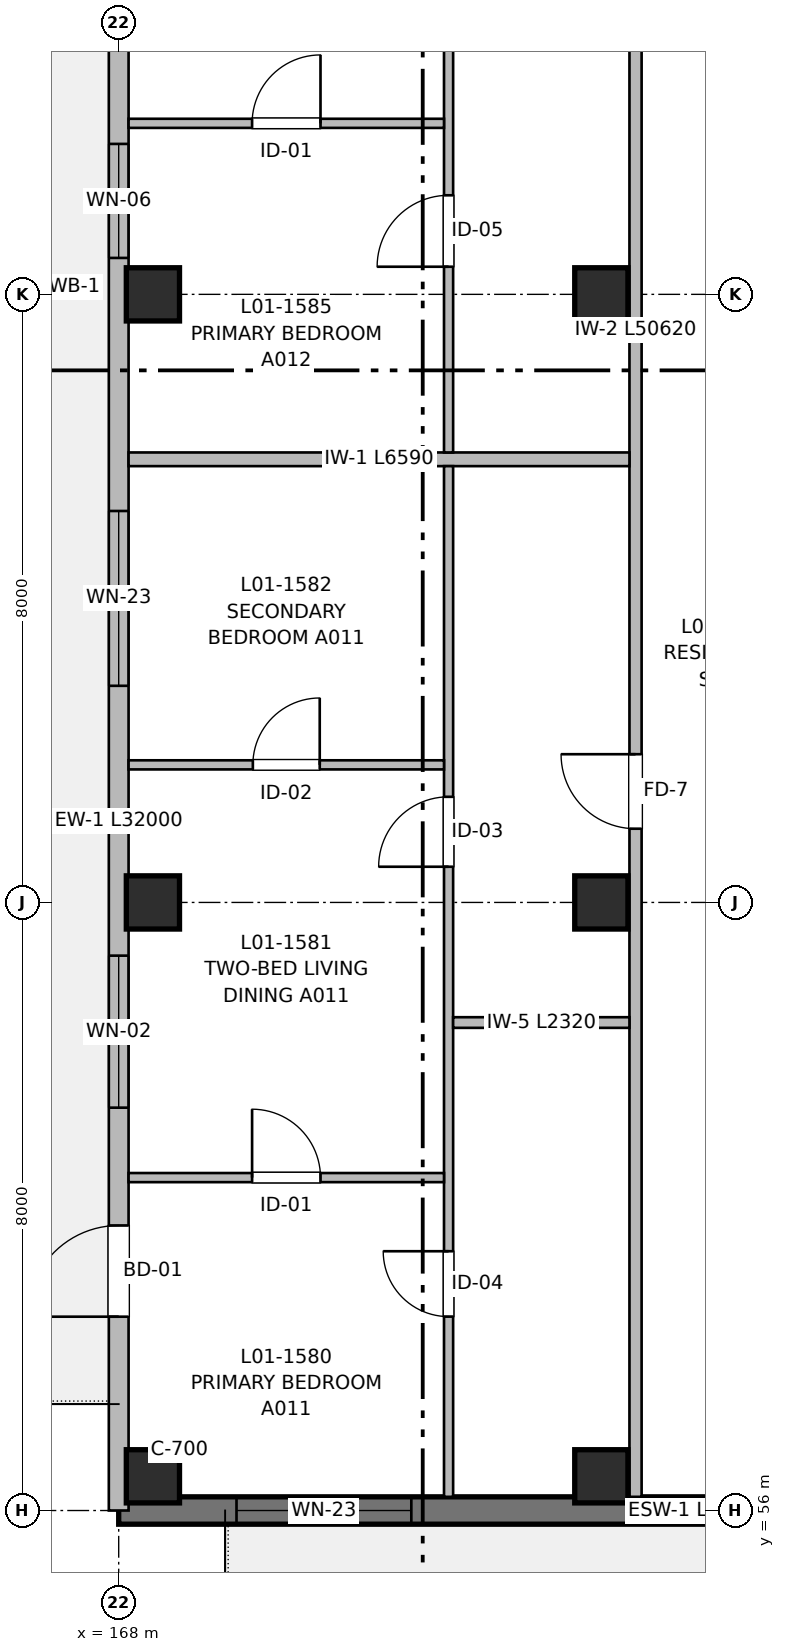
"""IFC4 building model, lengths in metres.
Left out: names, types, materials, properties, quantities, classifications, styles, units other than length and angle.
Written with IfcOpenShell. Run it as: python <this file> out.ifc"""

import sys

from ifc_helpers import new_model, si_unit, direction, frame, frame_2d, origin, origin_2d, place, context, subcontext, project, spatial, rectangle, extrude, element, fill, save


model = new_model("IFC4")
c1 = context("Model", 3, precision=1e-05, world=origin(), true_north=direction((0.0, 1.0)))
c2 = subcontext(c1, "Body", "Model", "MODEL_VIEW")
j1 = project(units=[si_unit("LENGTHUNIT", "METRE"), si_unit("PLANEANGLEUNIT", "RADIAN")], contexts=[c1])
p1 = place(None, origin())
s1 = spatial("IfcSite", under=j1, at=p1, CompositionType="ELEMENT")
p2 = place(p1, origin())
s2 = spatial("IfcBuilding", under=s1, at=p2, CompositionType="ELEMENT")
p3 = place(p2, frame((0.0, 0.0, 4.16)))
s3 = spatial("IfcBuildingStorey", under=s2, at=p3, CompositionType="ELEMENT", Elevation=4.16)
for number, where, z_axis, x_axis in (
    (1, (168.45, 56.45, 0.0), (0.0, 0.0, 1.0), (1.0, 0.0, 0.0)),
    (2, (168.45, 64.0, 0.0), (0.0, 0.0, 1.0), (1.0, 0.0, 0.0)),
    (3, (168.45, 72.0, 0.0), (0.0, 0.0, 1.0), (1.0, 0.0, 0.0)),
    (4, (174.35, 56.45, 0.0), (0.0, 0.0, 1.0), (1.0, 0.0, 0.0)),
    (5, (174.35, 64.0, 0.0), (0.0, 0.0, 1.0), (1.0, 0.0, 0.0)),
    (6, (174.35, 72.0, 0.0), (0.0, 0.0, 1.0), (1.0, 0.0, 0.0)),
):
    element("IfcColumn", number, at=place(p3, frame(where, z_axis=z_axis, x_axis=x_axis)), inside=s3, PredefinedType="COLUMN", context=c2, shape_type="SweptSolid", body=[
        extrude(rectangle(XDim=0.7, YDim=0.7, at=origin_2d()), origin(), (0.0, 0.0, 1.0), 3.2),
    ])
p4 = place(p3, frame((184.0, 56.0, 0.0), z_axis=(0.0, 0.0, 1.0), x_axis=(-1.0, 0.0, 0.0)))
e7 = element("IfcWall", 7, at=p4, inside=s3, PredefinedType="SHEAR", context=c2, shape_type="SweptSolid", body=[
    extrude(rectangle(XDim=16.0, YDim=0.36, at=frame_2d((8.0, 0.0))), origin(), (0.0, 0.0, 1.0), 2.98),
])
p5 = place(p4, frame((3.4, 0.0, 0.0)))
e8 = element("IfcOpeningElement", 8, at=p5, cuts=e7, PredefinedType="OPENING", context=c2, shape_type="SweptSolid", body=[
    extrude(rectangle(XDim=1.2, YDim=2.2, at=frame_2d((0.6, 1.1))), frame((0.0, 0.19, 0.0), z_axis=(0.0, -1.0, 0.0), x_axis=(1.0, 0.0, 0.0)), (0.0, 0.0, 1.0), 0.38),
])
p6 = place(p4, frame((12.15, 0.0, 0.57)))
e9 = element("IfcOpeningElement", 9, at=p6, cuts=e7, PredefinedType="OPENING", context=c2, shape_type="SweptSolid", body=[
    extrude(rectangle(XDim=2.3, YDim=1.65, at=frame_2d((1.15, 0.825))), frame((0.0, 0.19, 0.0), z_axis=(0.0, -1.0, 0.0), x_axis=(1.0, 0.0, 0.0)), (0.0, 0.0, 1.0), 0.38),
])
p7 = place(p3, frame((168.0, 56.0, 0.0), z_axis=(0.0, 0.0, 1.0), x_axis=(0.0, 1.0, 0.0)))
e10 = element("IfcWall", 10, at=p7, inside=s3, PredefinedType="SOLIDWALL", context=c2, shape_type="SweptSolid", body=[
    extrude(rectangle(XDim=32.0, YDim=0.26, at=frame_2d((16.0, 0.0))), origin(), (0.0, 0.0, 1.0), 2.98),
])
p8 = place(p7, frame((2.55, 0.0, 0.0)))
e11 = element("IfcOpeningElement", 11, at=p8, cuts=e10, PredefinedType="OPENING", context=c2, shape_type="SweptSolid", body=[
    extrude(rectangle(XDim=1.2, YDim=2.2, at=frame_2d((0.6, 1.1))), frame((0.0, 0.14, 0.0), z_axis=(0.0, -1.0, 0.0), x_axis=(1.0, 0.0, 0.0)), (0.0, 0.0, 1.0), 0.28),
])
p9 = place(p7, frame((5.3, 0.0, 0.72)))
e12 = element("IfcOpeningElement", 12, at=p9, cuts=e10, PredefinedType="OPENING", context=c2, shape_type="SweptSolid", body=[
    extrude(rectangle(XDim=2.0, YDim=1.5, at=frame_2d((1.0, 0.75))), frame((0.0, 0.14, 0.0), z_axis=(0.0, -1.0, 0.0), x_axis=(1.0, 0.0, 0.0)), (0.0, 0.0, 1.0), 0.28),
])
p10 = place(p7, frame((10.85, 0.0, 0.57)))
e13 = element("IfcOpeningElement", 13, at=p10, cuts=e10, PredefinedType="OPENING", context=c2, shape_type="SweptSolid", body=[
    extrude(rectangle(XDim=2.3, YDim=1.65, at=frame_2d((1.15, 0.825))), frame((0.0, 0.14, 0.0), z_axis=(0.0, -1.0, 0.0), x_axis=(1.0, 0.0, 0.0)), (0.0, 0.0, 1.0), 0.28),
])
p11 = place(p7, frame((19.275, 0.0, 0.77)))
e14 = element("IfcOpeningElement", 14, at=p11, cuts=e10, PredefinedType="OPENING", context=c2, shape_type="SweptSolid", body=[
    extrude(rectangle(XDim=1.45, YDim=1.45, at=frame_2d((0.725, 0.725))), frame((0.0, 0.14, 0.0), z_axis=(0.0, -1.0, 0.0), x_axis=(1.0, 0.0, 0.0)), (0.0, 0.0, 1.0), 0.28),
])
p12 = place(p7, frame((28.325, 0.0, 0.72)))
e15 = element("IfcOpeningElement", 15, at=p12, cuts=e10, PredefinedType="OPENING", context=c2, shape_type="SweptSolid", body=[
    extrude(rectangle(XDim=1.95, YDim=1.5, at=frame_2d((0.975, 0.75))), frame((0.0, 0.14, 0.0), z_axis=(0.0, -1.0, 0.0), x_axis=(1.0, 0.0, 0.0)), (0.0, 0.0, 1.0), 0.28),
])
p13 = place(p7, frame((16.479, 0.0, 0.82)))
e16 = element("IfcOpeningElement", 16, at=p13, cuts=e10, PredefinedType="OPENING", context=c2, shape_type="SweptSolid", body=[
    extrude(rectangle(XDim=1.5, YDim=1.4, at=frame_2d((0.75, 0.7))), frame((0.0, 0.14, 0.0), z_axis=(0.0, -1.0, 0.0), x_axis=(1.0, 0.0, 0.0)), (0.0, 0.0, 1.0), 0.28),
])
p14 = place(p7, frame((25.14, 0.0, 0.82)))
e17 = element("IfcOpeningElement", 17, at=p14, cuts=e10, PredefinedType="OPENING", context=c2, shape_type="SweptSolid", body=[
    extrude(rectangle(XDim=1.5, YDim=1.4, at=frame_2d((0.75, 0.7))), frame((0.0, 0.14, 0.0), z_axis=(0.0, -1.0, 0.0), x_axis=(1.0, 0.0, 0.0)), (0.0, 0.0, 1.0), 0.28),
])
p15 = place(p3, frame((174.8, 56.18, 0.0), z_axis=(0.0, 0.0, 1.0), x_axis=(0.0, 1.0, 0.0)))
e18 = element("IfcWall", 18, at=p15, inside=s3, PredefinedType="PARTITIONING", context=c2, shape_type="SweptSolid", body=[
    extrude(rectangle(XDim=50.62, YDim=0.16, at=frame_2d((25.31, 0.0))), origin(), (0.0, 0.0, 1.0), 2.935),
])
p16 = place(p15, frame((8.79, 0.0, 0.0)))
e19 = element("IfcOpeningElement", 19, at=p16, cuts=e18, PredefinedType="OPENING", context=c2, shape_type="SweptSolid", body=[
    extrude(rectangle(XDim=0.98, YDim=2.15, at=frame_2d((0.49, 1.075))), frame((0.0, 0.09, 0.0), z_axis=(0.0, -1.0, 0.0), x_axis=(1.0, 0.0, 0.0)), (0.0, 0.0, 1.0), 0.18),
])
p17 = place(p15, frame((20.92, 0.0, 0.0)))
e20 = element("IfcOpeningElement", 20, at=p17, cuts=e18, PredefinedType="OPENING", context=c2, shape_type="SweptSolid", body=[
    extrude(rectangle(XDim=1.02, YDim=2.15, at=frame_2d((0.51, 1.075))), frame((0.0, 0.09, 0.0), z_axis=(0.0, -1.0, 0.0), x_axis=(1.0, 0.0, 0.0)), (0.0, 0.0, 1.0), 0.18),
])
p18 = place(p15, frame((33.67, 0.0, 0.0)))
e21 = element("IfcOpeningElement", 21, at=p18, cuts=e18, PredefinedType="OPENING", context=c2, shape_type="SweptSolid", body=[
    extrude(rectangle(XDim=0.98, YDim=2.15, at=frame_2d((0.49, 1.075))), frame((0.0, 0.09, 0.0), z_axis=(0.0, -1.0, 0.0), x_axis=(1.0, 0.0, 0.0)), (0.0, 0.0, 1.0), 0.18),
])
p19 = place(p15, frame((45.06, 0.0, 0.0)))
e22 = element("IfcOpeningElement", 22, at=p19, cuts=e18, PredefinedType="OPENING", context=c2, shape_type="SweptSolid", body=[
    extrude(rectangle(XDim=0.98, YDim=2.15, at=frame_2d((0.49, 1.075))), frame((0.0, 0.09, 0.0), z_axis=(0.0, -1.0, 0.0), x_axis=(1.0, 0.0, 0.0)), (0.0, 0.0, 1.0), 0.18),
])
p20 = place(p3, frame((168.13, 69.83, 0.0), z_axis=(0.0, 0.0, 1.0), x_axis=(1.0, 0.0, 0.0)))
e23 = element("IfcWall", 23, at=p20, inside=s3, PredefinedType="PARTITIONING", context=c2, shape_type="SweptSolid", body=[
    extrude(rectangle(XDim=6.59, YDim=0.18, at=frame_2d((3.295, 0.0))), origin(), (0.0, 0.0, 1.0), 2.935),
])
p21 = place(p3, frame((172.34, 56.18, 0.0), z_axis=(0.0, 0.0, 1.0), x_axis=(0.0, 1.0, 0.0)))
e24 = element("IfcWall", 24, at=p21, inside=s3, PredefinedType="PARTITIONING", context=c2, shape_type="SweptSolid", body=[
    extrude(rectangle(XDim=13.56, YDim=0.12, at=frame_2d((6.78, 0.0))), origin(), (0.0, 0.0, 1.0), 2.935),
])
p22 = place(p21, frame((2.371, 0.0, 0.0)))
e25 = element("IfcOpeningElement", 25, at=p22, cuts=e24, PredefinedType="OPENING", context=c2, shape_type="SweptSolid", body=[
    extrude(rectangle(XDim=0.86, YDim=2.1, at=frame_2d((0.43, 1.05))), frame((0.0, 0.07, 0.0), z_axis=(0.0, -1.0, 0.0), x_axis=(1.0, 0.0, 0.0)), (0.0, 0.0, 1.0), 0.14),
])
p23 = place(p21, frame((8.29, 0.0, 0.0)))
e26 = element("IfcOpeningElement", 26, at=p23, cuts=e24, PredefinedType="OPENING", context=c2, shape_type="SweptSolid", body=[
    extrude(rectangle(XDim=0.92, YDim=2.1, at=frame_2d((0.46, 1.05))), frame((0.0, 0.07, 0.0), z_axis=(0.0, -1.0, 0.0), x_axis=(1.0, 0.0, 0.0)), (0.0, 0.0, 1.0), 0.14),
])
p24 = place(p3, frame((172.4, 62.42, 0.0), z_axis=(0.0, 0.0, 1.0), x_axis=(1.0, 0.0, 0.0)))
e27 = element("IfcWall", 27, at=p24, inside=s3, PredefinedType="PARTITIONING", context=c2, shape_type="SweptSolid", body=[
    extrude(rectangle(XDim=2.32, YDim=0.14, at=frame_2d((1.16, 0.0))), origin(), (0.0, 0.0, 1.0), 2.935),
])
p25 = place(p3, frame((168.13, 60.38, 0.0), z_axis=(0.0, 0.0, 1.0), x_axis=(1.0, 0.0, 0.0)))
e28 = element("IfcWall", 28, at=p25, inside=s3, PredefinedType="PARTITIONING", context=c2, shape_type="SweptSolid", body=[
    extrude(rectangle(XDim=4.15, YDim=0.12, at=frame_2d((2.075, 0.0))), origin(), (0.0, 0.0, 1.0), 2.935),
])
p26 = place(p25, frame((1.625, 0.0, 0.0)))
e29 = element("IfcOpeningElement", 29, at=p26, cuts=e28, PredefinedType="OPENING", context=c2, shape_type="SweptSolid", body=[
    extrude(rectangle(XDim=0.9, YDim=2.1, at=frame_2d((0.45, 1.05))), frame((0.0, 0.07, 0.0), z_axis=(0.0, -1.0, 0.0), x_axis=(1.0, 0.0, 0.0)), (0.0, 0.0, 1.0), 0.14),
])
p27 = place(p3, frame((168.13, 65.81, 0.0), z_axis=(0.0, 0.0, 1.0), x_axis=(1.0, 0.0, 0.0)))
e30 = element("IfcWall", 30, at=p27, inside=s3, PredefinedType="PARTITIONING", context=c2, shape_type="SweptSolid", body=[
    extrude(rectangle(XDim=4.15, YDim=0.12, at=frame_2d((2.075, 0.0))), origin(), (0.0, 0.0, 1.0), 2.935),
])
p28 = place(p27, frame((1.635, 0.0, 0.0)))
e31 = element("IfcOpeningElement", 31, at=p28, cuts=e30, PredefinedType="OPENING", context=c2, shape_type="SweptSolid", body=[
    extrude(rectangle(XDim=0.88, YDim=2.1, at=frame_2d((0.44, 1.05))), frame((0.0, 0.07, 0.0), z_axis=(0.0, -1.0, 0.0), x_axis=(1.0, 0.0, 0.0)), (0.0, 0.0, 1.0), 0.14),
])
p29 = place(p3, frame((172.34, 69.92, 0.0), z_axis=(0.0, 0.0, 1.0), x_axis=(0.0, 1.0, 0.0)))
e32 = element("IfcWall", 32, at=p29, inside=s3, PredefinedType="PARTITIONING", context=c2, shape_type="SweptSolid", body=[
    extrude(rectangle(XDim=13.97, YDim=0.12, at=frame_2d((6.985, 0.0))), origin(), (0.0, 0.0, 1.0), 2.935),
])
p30 = place(p29, frame((2.443, 0.0, 0.0)))
e33 = element("IfcOpeningElement", 33, at=p30, cuts=e32, PredefinedType="OPENING", context=c2, shape_type="SweptSolid", body=[
    extrude(rectangle(XDim=0.94, YDim=2.1, at=frame_2d((0.47, 1.05))), frame((0.0, 0.07, 0.0), z_axis=(0.0, -1.0, 0.0), x_axis=(1.0, 0.0, 0.0)), (0.0, 0.0, 1.0), 0.14),
])
p31 = place(p29, frame((8.541, 0.0, 0.0)))
e34 = element("IfcOpeningElement", 34, at=p31, cuts=e32, PredefinedType="OPENING", context=c2, shape_type="SweptSolid", body=[
    extrude(rectangle(XDim=0.92, YDim=2.1, at=frame_2d((0.46, 1.05))), frame((0.0, 0.07, 0.0), z_axis=(0.0, -1.0, 0.0), x_axis=(1.0, 0.0, 0.0)), (0.0, 0.0, 1.0), 0.14),
])
p32 = place(p3, frame((168.13, 74.25, 0.0), z_axis=(0.0, 0.0, 1.0), x_axis=(1.0, 0.0, 0.0)))
e35 = element("IfcWall", 35, at=p32, inside=s3, PredefinedType="PARTITIONING", context=c2, shape_type="SweptSolid", body=[
    extrude(rectangle(XDim=4.15, YDim=0.12, at=frame_2d((2.075, 0.0))), origin(), (0.0, 0.0, 1.0), 2.935),
])
p33 = place(p32, frame((1.625, 0.0, 0.0)))
e36 = element("IfcOpeningElement", 36, at=p33, cuts=e35, PredefinedType="OPENING", context=c2, shape_type="SweptSolid", body=[
    extrude(rectangle(XDim=0.9, YDim=2.1, at=frame_2d((0.45, 1.05))), frame((0.0, 0.07, 0.0), z_axis=(0.0, -1.0, 0.0), x_axis=(1.0, 0.0, 0.0)), (0.0, 0.0, 1.0), 0.14),
])
p34 = place(p6, origin())
e37 = element("IfcWindow", 37, at=p34, inside=s3, PartitioningType="SINGLE_PANEL", PredefinedType="WINDOW", context=c2, shape_type="SweptSolid", body=[
    extrude(rectangle(XDim=2.3, YDim=1.65, at=frame_2d((1.15, 0.825))), frame((0.0, 0.03, 0.0), z_axis=(0.0, -1.0, 0.0), x_axis=(1.0, 0.0, 0.0)), (0.0, 0.0, 1.0), 0.06),
])
fill(e9, e37)
p35 = place(p8, origin())
e38 = element("IfcDoor", 38, at=p35, inside=s3, OperationType="SINGLE_SWING_LEFT", PredefinedType="DOOR", context=c2, shape_type="SweptSolid", body=[
    extrude(rectangle(XDim=1.2, YDim=2.2, at=frame_2d((0.6, 1.1))), frame((0.0, 0.025, 0.0), z_axis=(0.0, -1.0, 0.0), x_axis=(1.0, 0.0, 0.0)), (0.0, 0.0, 1.0), 0.05),
])
fill(e11, e38)
p36 = place(p9, origin())
e39 = element("IfcWindow", 39, at=p36, inside=s3, PartitioningType="SINGLE_PANEL", PredefinedType="WINDOW", context=c2, shape_type="SweptSolid", body=[
    extrude(rectangle(XDim=2.0, YDim=1.5, at=frame_2d((1.0, 0.75))), frame((0.0, 0.03, 0.0), z_axis=(0.0, -1.0, 0.0), x_axis=(1.0, 0.0, 0.0)), (0.0, 0.0, 1.0), 0.06),
])
fill(e12, e39)
p37 = place(p10, origin())
e40 = element("IfcWindow", 40, at=p37, inside=s3, PartitioningType="SINGLE_PANEL", PredefinedType="WINDOW", context=c2, shape_type="SweptSolid", body=[
    extrude(rectangle(XDim=2.3, YDim=1.65, at=frame_2d((1.15, 0.825))), frame((0.0, 0.03, 0.0), z_axis=(0.0, -1.0, 0.0), x_axis=(1.0, 0.0, 0.0)), (0.0, 0.0, 1.0), 0.06),
])
fill(e13, e40)
p38 = place(p22, origin())
e41 = element("IfcDoor", 41, at=p38, inside=s3, OperationType="SINGLE_SWING_RIGHT", PredefinedType="DOOR", context=c2, shape_type="SweptSolid", body=[
    extrude(rectangle(XDim=0.86, YDim=2.1, at=frame_2d((0.43, 1.05))), frame((0.0, 0.025, 0.0), z_axis=(0.0, -1.0, 0.0), x_axis=(1.0, 0.0, 0.0)), (0.0, 0.0, 1.0), 0.05),
])
fill(e25, e41)
p39 = place(p23, origin())
e42 = element("IfcDoor", 42, at=p39, inside=s3, OperationType="SINGLE_SWING_LEFT", PredefinedType="DOOR", context=c2, shape_type="SweptSolid", body=[
    extrude(rectangle(XDim=0.92, YDim=2.1, at=frame_2d((0.46, 1.05))), frame((0.0, 0.025, 0.0), z_axis=(0.0, -1.0, 0.0), x_axis=(1.0, 0.0, 0.0)), (0.0, 0.0, 1.0), 0.05),
])
fill(e26, e42)
p40 = place(p16, origin())
e43 = element("IfcDoor", 43, at=p40, inside=s3, OperationType="SINGLE_SWING_RIGHT", PredefinedType="DOOR", context=c2, shape_type="SweptSolid", body=[
    extrude(rectangle(XDim=0.98, YDim=2.15, at=frame_2d((0.49, 1.075))), frame((0.0, 0.025, 0.0), z_axis=(0.0, -1.0, 0.0), x_axis=(1.0, 0.0, 0.0)), (0.0, 0.0, 1.0), 0.05),
])
fill(e19, e43)
p41 = place(p26, origin())
e44 = element("IfcDoor", 44, at=p41, inside=s3, OperationType="SINGLE_SWING_LEFT", PredefinedType="DOOR", context=c2, shape_type="SweptSolid", body=[
    extrude(rectangle(XDim=0.9, YDim=2.1, at=frame_2d((0.45, 1.05))), frame((0.0, 0.025, 0.0), z_axis=(0.0, -1.0, 0.0), x_axis=(1.0, 0.0, 0.0)), (0.0, 0.0, 1.0), 0.05),
])
fill(e29, e44)
p42 = place(p28, origin())
e45 = element("IfcDoor", 45, at=p42, inside=s3, OperationType="SINGLE_SWING_RIGHT", PredefinedType="DOOR", context=c2, shape_type="SweptSolid", body=[
    extrude(rectangle(XDim=0.88, YDim=2.1, at=frame_2d((0.44, 1.05))), frame((0.0, 0.025, 0.0), z_axis=(0.0, -1.0, 0.0), x_axis=(1.0, 0.0, 0.0)), (0.0, 0.0, 1.0), 0.05),
])
fill(e31, e45)
p43 = place(p30, origin())
e46 = element("IfcDoor", 46, at=p43, inside=s3, OperationType="SINGLE_SWING_LEFT", PredefinedType="DOOR", context=c2, shape_type="SweptSolid", body=[
    extrude(rectangle(XDim=0.94, YDim=2.1, at=frame_2d((0.47, 1.05))), frame((0.0, 0.025, 0.0), z_axis=(0.0, -1.0, 0.0), x_axis=(1.0, 0.0, 0.0)), (0.0, 0.0, 1.0), 0.05),
])
fill(e33, e46)
p44 = place(p33, origin())
e47 = element("IfcDoor", 47, at=p44, inside=s3, OperationType="SINGLE_SWING_RIGHT", PredefinedType="DOOR", context=c2, shape_type="SweptSolid", body=[
    extrude(rectangle(XDim=0.9, YDim=2.1, at=frame_2d((0.45, 1.05))), frame((0.0, 0.025, 0.0), z_axis=(0.0, -1.0, 0.0), x_axis=(1.0, 0.0, 0.0)), (0.0, 0.0, 1.0), 0.05),
])
fill(e36, e47)
p45 = place(p13, origin())
e48 = element("IfcWindow", 48, at=p45, inside=s3, PartitioningType="SINGLE_PANEL", PredefinedType="WINDOW", context=c2, shape_type="SweptSolid", body=[
    extrude(rectangle(XDim=1.5, YDim=1.4, at=frame_2d((0.75, 0.7))), frame((0.0, 0.03, 0.0), z_axis=(0.0, -1.0, 0.0), x_axis=(1.0, 0.0, 0.0)), (0.0, 0.0, 1.0), 0.06),
])
fill(e16, e48)
save(model, sys.argv[1])
